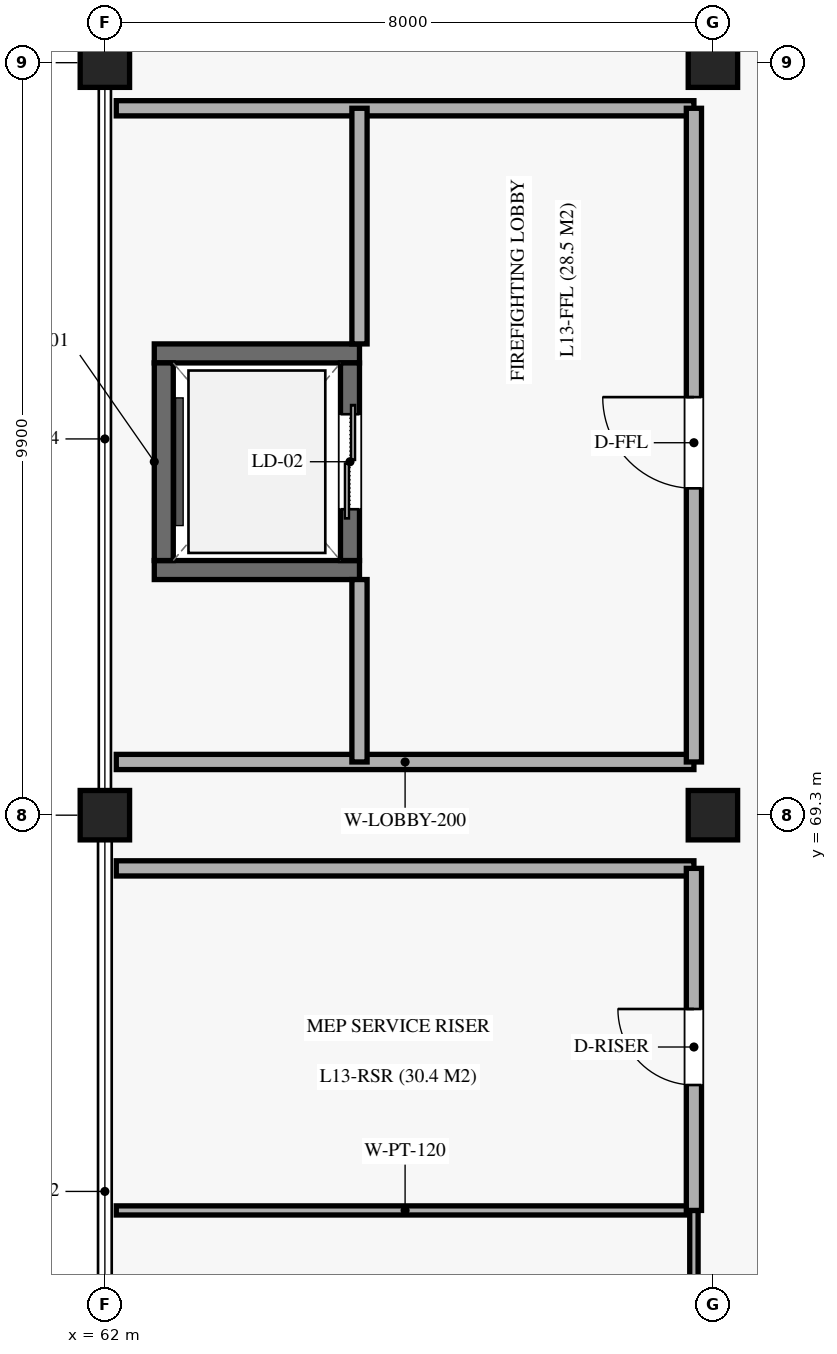
"""IFC4 building model, lengths in metres.
Left out: names, types, materials, properties, quantities, classifications, styles, units other than length and angle.
Written with IfcOpenShell. Run it as: python <this file> out.ifc"""

import sys

from ifc_helpers import new_model, si_unit, direction, frame, frame_2d, origin, origin_2d, place, context, subcontext, project, spatial, rectangle, extrude, element, fill, save


model = new_model("IFC4")
c1 = context("Model", 3, precision=1e-05, world=origin(), true_north=direction((0.0, 1.0)))
c2 = subcontext(c1, "Body", "Model", "MODEL_VIEW")
j1 = project(units=[si_unit("LENGTHUNIT", "METRE"), si_unit("PLANEANGLEUNIT", "RADIAN")], contexts=[c1])
p1 = place(None, origin())
s1 = spatial("IfcSite", under=j1, at=p1, CompositionType="ELEMENT")
p2 = place(p1, origin())
s2 = spatial("IfcBuilding", under=s1, at=p2, CompositionType="ELEMENT")
p3 = place(p2, frame((0.0, 0.0, 66.3)))
s3 = spatial("IfcBuildingStorey", under=s2, at=p3, CompositionType="ELEMENT", Elevation=66.3)
for number, where, z_axis, x_axis in (
    (1, (62.0, 69.3, 0.0), (0.0, 0.0, 1.0), (1.0, 0.0, 0.0)),
    (2, (62.0, 79.2, 0.0), (0.0, 0.0, 1.0), (1.0, 0.0, 0.0)),
    (3, (70.0, 69.3, 0.0), (0.0, 0.0, 1.0), (1.0, 0.0, 0.0)),
    (4, (70.0, 79.2, 0.0), (0.0, 0.0, 1.0), (1.0, 0.0, 0.0)),
):
    element("IfcColumn", number, at=place(p3, frame(where, z_axis=z_axis, x_axis=x_axis)), inside=s3, PredefinedType="COLUMN", context=c2, shape_type="SweptSolid", body=[
        extrude(rectangle(XDim=0.65, YDim=0.65, at=origin_2d()), origin(), (0.0, 0.0, 1.0), 4.08),
    ])
for number, where, z_axis, x_axis in (
    (5, (62.65, 72.525, 0.0), (0.0, 0.0, 1.0), (1.0, 0.0, 0.0)),
    (6, (62.65, 75.375, 0.0), (0.0, 0.0, 1.0), (1.0, 0.0, 0.0)),
):
    element("IfcWall", number, at=place(p3, frame(where, z_axis=z_axis, x_axis=x_axis)), inside=s3, PredefinedType="SOLIDWALL", context=c2, shape_type="SweptSolid", body=[
        extrude(rectangle(XDim=2.7, YDim=0.25, at=frame_2d((1.35, 0.0))), origin(), (0.0, 0.0, 1.0), 3.81),
    ])
p4 = place(p3, frame((62.775, 72.65, 0.0), z_axis=(0.0, 0.0, 1.0), x_axis=(0.0, 1.0, 0.0)))
e7 = element("IfcWall", 7, at=p4, inside=s3, PredefinedType="SOLIDWALL", context=c2, shape_type="SweptSolid", body=[
    extrude(rectangle(XDim=2.6, YDim=0.25, at=frame_2d((1.3, 0.0))), origin(), (0.0, 0.0, 1.0), 3.81),
])
p5 = place(p3, frame((65.225, 72.65, 0.0), z_axis=(0.0, 0.0, 1.0), x_axis=(0.0, 1.0, 0.0)))
e8 = element("IfcWall", 8, at=p5, inside=s3, PredefinedType="SOLIDWALL", context=c2, shape_type="SweptSolid", body=[
    extrude(rectangle(XDim=2.6, YDim=0.25, at=frame_2d((1.3, 0.0))), origin(), (0.0, 0.0, 1.0), 3.81),
])
p6 = place(p5, frame((0.675, 0.0, 0.0)))
e9 = element("IfcOpeningElement", 9, at=p6, cuts=e8, PredefinedType="OPENING", context=c2, shape_type="SweptSolid", body=[
    extrude(rectangle(XDim=1.25, YDim=2.2, at=frame_2d((0.625, 1.1))), frame((0.0, 0.135, 0.0), z_axis=(0.0, -1.0, 0.0), x_axis=(1.0, 0.0, 0.0)), (0.0, 0.0, 1.0), 0.27),
])
for number, where, z_axis, x_axis in (
    (10, (62.15, 70.0, 0.0), (0.0, 0.0, 1.0), (1.0, 0.0, 0.0)),
    (11, (62.15, 78.6, 0.0), (0.0, 0.0, 1.0), (1.0, 0.0, 0.0)),
):
    element("IfcWall", number, at=place(p3, frame(where, z_axis=z_axis, x_axis=x_axis)), inside=s3, PredefinedType="SOLIDWALL", context=c2, shape_type="SweptSolid", body=[
        extrude(rectangle(XDim=7.6, YDim=0.2, at=frame_2d((3.8, 0.0))), origin(), (0.0, 0.0, 1.0), 2.95),
    ])
p7 = place(p3, frame((65.35, 70.0, 0.0), z_axis=(0.0, 0.0, 1.0), x_axis=(0.0, 1.0, 0.0)))
e12 = element("IfcWall", 12, at=p7, inside=s3, PredefinedType="SOLIDWALL", context=c2, shape_type="SweptSolid", body=[
    extrude(rectangle(XDim=2.4, YDim=0.2, at=frame_2d((1.2, 0.0))), origin(), (0.0, 0.0, 1.0), 2.95),
])
p8 = place(p3, frame((65.35, 75.5, 0.0), z_axis=(0.0, 0.0, 1.0), x_axis=(0.0, 1.0, 0.0)))
e13 = element("IfcWall", 13, at=p8, inside=s3, PredefinedType="SOLIDWALL", context=c2, shape_type="SweptSolid", body=[
    extrude(rectangle(XDim=3.1, YDim=0.2, at=frame_2d((1.55, 0.0))), origin(), (0.0, 0.0, 1.0), 2.95),
])
p9 = place(p3, frame((69.75, 70.0, 0.0), z_axis=(0.0, 0.0, 1.0), x_axis=(0.0, 1.0, 0.0)))
e14 = element("IfcWall", 14, at=p9, inside=s3, PredefinedType="SOLIDWALL", context=c2, shape_type="SweptSolid", body=[
    extrude(rectangle(XDim=8.6, YDim=0.2, at=frame_2d((4.3, 0.0))), origin(), (0.0, 0.0, 1.0), 2.95),
])
p10 = place(p9, frame((3.6, 0.0, 0.0)))
e15 = element("IfcOpeningElement", 15, at=p10, cuts=e14, PredefinedType="OPENING", context=c2, shape_type="SweptSolid", body=[
    extrude(rectangle(XDim=1.2, YDim=2.25, at=frame_2d((0.6, 1.125))), frame((0.0, 0.11, 0.0), z_axis=(0.0, -1.0, 0.0), x_axis=(1.0, 0.0, 0.0)), (0.0, 0.0, 1.0), 0.22),
])
p11 = place(p3, frame((62.15, 64.1, 0.0), z_axis=(0.0, 0.0, 1.0), x_axis=(1.0, 0.0, 0.0)))
e16 = element("IfcWall", 16, at=p11, inside=s3, PredefinedType="PARTITIONING", context=c2, shape_type="SweptSolid", body=[
    extrude(rectangle(XDim=7.6, YDim=0.12, at=frame_2d((3.8, 0.0))), origin(), (0.0, 0.0, 1.0), 2.95),
])
p12 = place(p3, frame((69.75, 59.9, 0.0), z_axis=(0.0, 0.0, 1.0), x_axis=(0.0, 1.0, 0.0)))
e17 = element("IfcWall", 17, at=p12, inside=s3, PredefinedType="PARTITIONING", context=c2, shape_type="SweptSolid", body=[
    extrude(rectangle(XDim=4.2, YDim=0.11, at=frame_2d((2.1, 0.0))), origin(), (0.0, 0.0, 1.0), 2.95),
])
p13 = place(p12, frame((1.5, 0.0, 0.0)))
e18 = element("IfcOpeningElement", 18, at=p13, cuts=e17, PredefinedType="OPENING", context=c2, shape_type="SweptSolid", body=[
    extrude(rectangle(XDim=0.95, YDim=2.1, at=frame_2d((0.475, 1.05))), frame((0.0, 0.065, 0.0), z_axis=(0.0, -1.0, 0.0), x_axis=(1.0, 0.0, 0.0)), (0.0, 0.0, 1.0), 0.13),
])
p14 = place(p3, frame((62.15, 68.6, 0.0), z_axis=(0.0, 0.0, 1.0), x_axis=(1.0, 0.0, 0.0)))
e19 = element("IfcWall", 19, at=p14, inside=s3, PredefinedType="SOLIDWALL", context=c2, shape_type="SweptSolid", body=[
    extrude(rectangle(XDim=7.6, YDim=0.2, at=frame_2d((3.8, 0.0))), origin(), (0.0, 0.0, 1.0), 2.95),
])
p15 = place(p3, frame((69.75, 64.1, 0.0), z_axis=(0.0, 0.0, 1.0), x_axis=(0.0, 1.0, 0.0)))
e20 = element("IfcWall", 20, at=p15, inside=s3, PredefinedType="SOLIDWALL", context=c2, shape_type="SweptSolid", body=[
    extrude(rectangle(XDim=4.5, YDim=0.2, at=frame_2d((2.25, 0.0))), origin(), (0.0, 0.0, 1.0), 2.95),
])
p16 = place(p15, frame((1.65, 0.0, 0.0)))
e21 = element("IfcOpeningElement", 21, at=p16, cuts=e20, PredefinedType="OPENING", context=c2, shape_type="SweptSolid", body=[
    extrude(rectangle(XDim=1.0, YDim=2.15, at=frame_2d((0.5, 1.075))), frame((0.0, 0.11, 0.0), z_axis=(0.0, -1.0, 0.0), x_axis=(1.0, 0.0, 0.0)), (0.0, 0.0, 1.0), 0.22),
])
p17 = place(p6, origin())
e22 = element("IfcDoor", 22, at=p17, inside=s3, OperationType="DOUBLE_DOOR_SLIDING", PredefinedType="DOOR", context=c2, shape_type="SweptSolid", body=[
    extrude(rectangle(XDim=1.25, YDim=2.2, at=frame_2d((0.625, 1.1))), frame((0.0, 0.025, 0.0), z_axis=(0.0, -1.0, 0.0), x_axis=(1.0, 0.0, 0.0)), (0.0, 0.0, 1.0), 0.05),
])
fill(e9, e22)
p18 = place(p10, origin())
e23 = element("IfcDoor", 23, at=p18, inside=s3, OperationType="SINGLE_SWING_RIGHT", PredefinedType="DOOR", context=c2, shape_type="SweptSolid", body=[
    extrude(rectangle(XDim=1.2, YDim=2.25, at=frame_2d((0.6, 1.125))), frame((0.0, 0.025, 0.0), z_axis=(0.0, -1.0, 0.0), x_axis=(1.0, 0.0, 0.0)), (0.0, 0.0, 1.0), 0.05),
])
fill(e15, e23)
p19 = place(p16, origin())
e24 = element("IfcDoor", 24, at=p19, inside=s3, OperationType="SINGLE_SWING_RIGHT", PredefinedType="DOOR", context=c2, shape_type="SweptSolid", body=[
    extrude(rectangle(XDim=1.0, YDim=2.15, at=frame_2d((0.5, 1.075))), frame((0.0, 0.025, 0.0), z_axis=(0.0, -1.0, 0.0), x_axis=(1.0, 0.0, 0.0)), (0.0, 0.0, 1.0), 0.05),
])
fill(e21, e24)
save(model, sys.argv[1])
